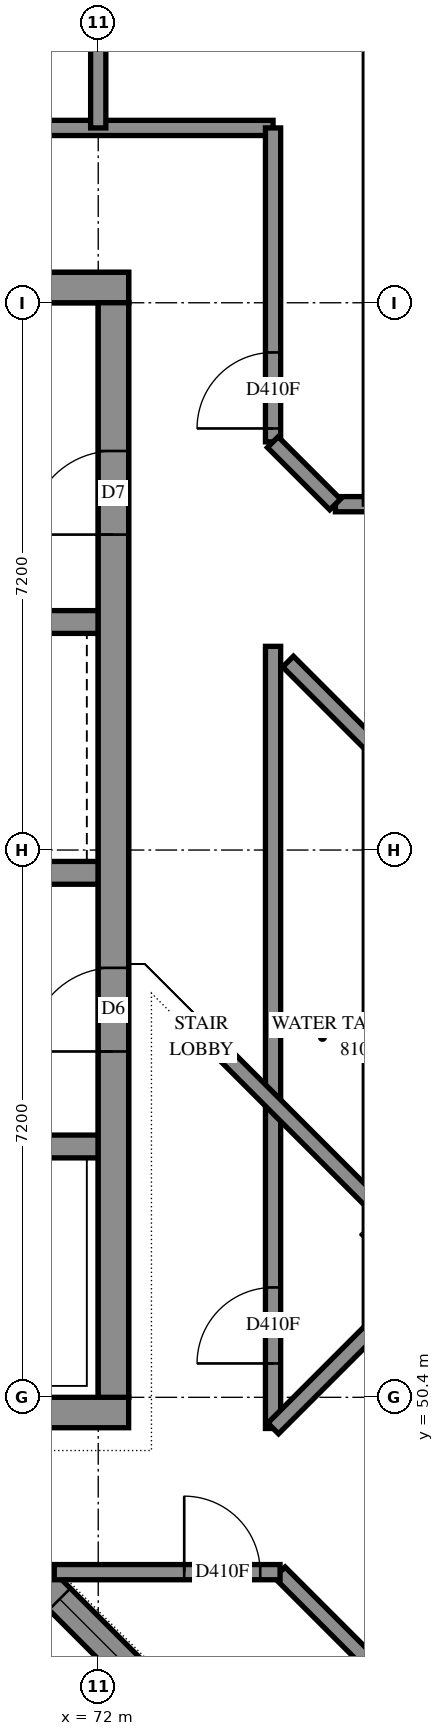
"""IFC4 building model, lengths in metres.
Left out: names, types, materials, properties, quantities, classifications, styles, units other than length and angle.
Written with IfcOpenShell. Run it as: python <this file> out.ifc"""

import sys

from ifc_helpers import new_model, si_unit, direction, frame, frame_2d, origin, place, context, subcontext, project, spatial, polyline, rectangle, outline, extrude, element, fill, save


model = new_model("IFC4")
c1 = context("Model", 3, precision=1e-05, world=origin(), true_north=direction((0.0, 1.0)))
c2 = subcontext(c1, "Body", "Model", "MODEL_VIEW")
j1 = project(units=[si_unit("LENGTHUNIT", "METRE"), si_unit("PLANEANGLEUNIT", "RADIAN")], contexts=[c1])
p1 = place(None, origin())
s1 = spatial("IfcSite", under=j1, at=p1, CompositionType="ELEMENT")
p2 = place(p1, origin())
s2 = spatial("IfcBuilding", under=s1, at=p2, CompositionType="ELEMENT")
p3 = place(p2, frame((0.0, 0.0, 298.2)))
s3 = spatial("IfcBuildingStorey", under=s2, at=p3, CompositionType="ELEMENT", Elevation=298.2)
p4 = place(p3, frame((69.746, 50.2, -0.3), z_axis=(0.0, 0.0, 1.0), x_axis=(1.0, 0.0, 0.0)))
e1 = element("IfcWall", 1, at=p4, inside=s3, PredefinedType="SHEAR", context=c2, shape_type="SweptSolid", body=[
    extrude(outline(polyline([(0.0, 0.0), (2.654, 0.0), (2.654, 3.1), (0.0, 3.1), (0.0, 0.0)])), frame((0.0, 0.2, 0.0), z_axis=(0.0, -1.0, 0.0), x_axis=(1.0, 0.0, 0.0)), (0.0, 0.0, 1.0), 0.4),
])
p5 = place(p3, frame((57.2, 65.0, -0.3), z_axis=(0.0, 0.0, 1.0), x_axis=(1.0, 0.0, 0.0)))
e2 = element("IfcWall", 2, at=p5, inside=s3, PredefinedType="SHEAR", context=c2, shape_type="SweptSolid", body=[
    extrude(outline(polyline([(0.0, 0.0), (15.2, 0.0), (15.2, 3.1), (0.0, 3.1), (0.0, 0.0)])), frame((0.0, 0.2, 0.0), z_axis=(0.0, -1.0, 0.0), x_axis=(1.0, 0.0, 0.0)), (0.0, 0.0, 1.0), 0.4),
])
p6 = place(p5, frame((10.4, 0.0, 0.3)))
e3 = element("IfcOpeningElement", 3, at=p6, cuts=e2, PredefinedType="OPENING", context=c2, shape_type="SweptSolid", body=[
    extrude(rectangle(XDim=0.8, YDim=2.1, at=frame_2d((0.4, 1.05))), frame((0.0, 0.21, 0.0), z_axis=(0.0, -1.0, 0.0), x_axis=(1.0, 0.0, 0.0)), (0.0, 0.0, 1.0), 0.42),
])
p7 = place(p3, frame((72.2, 50.4, -0.3), z_axis=(0.0, 0.0, 1.0), x_axis=(0.0, 1.0, 0.0)))
e4 = element("IfcWall", 4, at=p7, inside=s3, PredefinedType="SHEAR", context=c2, shape_type="SweptSolid", body=[
    extrude(outline(polyline([(0.0, 0.0), (14.4, 0.0), (14.4, 3.1), (0.0, 3.1), (0.0, 0.0)])), frame((0.0, 0.2, 0.0), z_axis=(0.0, -1.0, 0.0), x_axis=(1.0, 0.0, 0.0)), (0.0, 0.0, 1.0), 0.4),
])
p8 = place(p7, frame((4.55, 0.0, 0.3)))
e5 = element("IfcOpeningElement", 5, at=p8, cuts=e4, PredefinedType="OPENING", context=c2, shape_type="SweptSolid", body=[
    extrude(rectangle(XDim=1.1, YDim=2.1, at=frame_2d((0.55, 1.05))), frame((0.0, 0.21, 0.0), z_axis=(0.0, -1.0, 0.0), x_axis=(1.0, 0.0, 0.0)), (0.0, 0.0, 1.0), 0.42),
])
p9 = place(p7, frame((11.35, 0.0, 0.3)))
e6 = element("IfcOpeningElement", 6, at=p9, cuts=e4, PredefinedType="OPENING", context=c2, shape_type="SweptSolid", body=[
    extrude(rectangle(XDim=1.1, YDim=2.1, at=frame_2d((0.55, 1.05))), frame((0.0, 0.21, 0.0), z_axis=(0.0, -1.0, 0.0), x_axis=(1.0, 0.0, 0.0)), (0.0, 0.0, 1.0), 0.42),
])
p10 = place(p3, frame((66.246, 53.7, 0.0), z_axis=(0.0, 0.0, 1.0), x_axis=(1.0, 0.0, 0.0)))
e7 = element("IfcWall", 7, at=p10, inside=s3, PredefinedType="SOLIDWALL", context=c2, shape_type="SweptSolid", body=[
    extrude(outline(polyline([(0.0, 0.0), (5.754, 0.0), (5.754, 3.5), (0.0, 3.5), (0.0, 0.0)])), frame((0.0, 0.15, 0.0), z_axis=(0.0, -1.0, 0.0), x_axis=(1.0, 0.0, 0.0)), (0.0, 0.0, 1.0), 0.3),
])
p11 = place(p10, frame((3.404, 0.0, 0.0)))
e8 = element("IfcOpeningElement", 8, at=p11, cuts=e7, PredefinedType="OPENING", context=c2, shape_type="SweptSolid", body=[
    extrude(rectangle(XDim=1.1, YDim=2.1, at=frame_2d((0.55, 1.05))), frame((0.0, 0.16, 0.0), z_axis=(0.0, -1.0, 0.0), x_axis=(1.0, 0.0, 0.0)), (0.0, 0.0, 1.0), 0.32),
])
p12 = place(p3, frame((57.6, 57.3, 0.0), z_axis=(0.0, 0.0, 1.0), x_axis=(1.0, 0.0, 0.0)))
e9 = element("IfcWall", 9, at=p12, inside=s3, PredefinedType="SOLIDWALL", context=c2, shape_type="SweptSolid", body=[
    extrude(outline(polyline([(0.0, 0.0), (14.4, 0.0), (14.4, 3.5), (0.0, 3.5), (0.0, 0.0)])), frame((0.0, 0.15, 0.0), z_axis=(0.0, -1.0, 0.0), x_axis=(1.0, 0.0, 0.0)), (0.0, 0.0, 1.0), 0.3),
])
p13 = place(p12, frame((12.05, 0.0, 0.0)))
e10 = element("IfcOpeningElement", 10, at=p13, cuts=e9, PredefinedType="OPENING", context=c2, shape_type="SweptSolid", body=[
    extrude(rectangle(XDim=1.1, YDim=2.1, at=frame_2d((0.55, 1.05))), frame((0.0, 0.16, 0.0), z_axis=(0.0, -1.0, 0.0), x_axis=(1.0, 0.0, 0.0)), (0.0, 0.0, 1.0), 0.32),
])
p14 = place(p3, frame((64.8, 60.6, 0.0), z_axis=(0.0, 0.0, 1.0), x_axis=(1.0, 0.0, 0.0)))
e11 = element("IfcWall", 11, at=p14, inside=s3, PredefinedType="SOLIDWALL", context=c2, shape_type="SweptSolid", body=[
    extrude(outline(polyline([(0.0, 0.0), (7.2, 0.0), (7.2, 3.5), (0.0, 3.5), (0.0, 0.0)])), frame((0.0, 0.15, 0.0), z_axis=(0.0, -1.0, 0.0), x_axis=(1.0, 0.0, 0.0)), (0.0, 0.0, 1.0), 0.3),
])
p15 = place(p3, frame((70.585, 48.654, 0.0), z_axis=(0.0, 0.0, 1.0), x_axis=(0.707112816, -0.7071007463, 0.0)))
e12 = element("IfcWall", 12, at=p15, inside=s3, PredefinedType="SOLIDWALL", context=c2, shape_type="SweptSolid", body=[
    extrude(outline(polyline([(0.0, -0.2), (8.256, -0.2), (8.314, 0.2), (0.0, 0.2), (0.0, -0.2)])), origin(), (0.0, 0.0, 1.0), 3.5),
])
p16 = place(p15, frame((1.284, 0.0, 0.7)))
e13 = element("IfcOpeningElement", 13, at=p16, cuts=e12, PredefinedType="OPENING", context=c2, shape_type="SweptSolid", body=[
    extrude(rectangle(XDim=1.8, YDim=2.2, at=frame_2d((0.9, 1.1))), frame((0.0, 0.21, 0.0), z_axis=(0.0, -1.0, 0.0), x_axis=(1.0, 0.0, 0.0)), (0.0, 0.0, 1.0), 0.42),
])
p17 = place(p15, frame((4.884, 0.0, 0.7)))
e14 = element("IfcOpeningElement", 14, at=p17, cuts=e12, PredefinedType="OPENING", context=c2, shape_type="SweptSolid", body=[
    extrude(rectangle(XDim=1.8, YDim=2.2, at=frame_2d((0.9, 1.1))), frame((0.0, 0.21, 0.0), z_axis=(0.0, -1.0, 0.0), x_axis=(1.0, 0.0, 0.0)), (0.0, 0.0, 1.0), 0.42),
])
p18 = place(p3, frame((55.302, 67.1, 0.0), z_axis=(0.0, 0.0, 1.0), x_axis=(1.0, 0.0, 0.0)))
e15 = element("IfcWall", 15, at=p18, inside=s3, PredefinedType="PARTITIONING", context=c2, shape_type="SweptSolid", body=[
    extrude(rectangle(XDim=18.998, YDim=0.2, at=frame_2d((9.499, 0.0))), origin(), (0.0, 0.0, 1.0), 3.5),
])
p19 = place(p18, frame((0.758, 0.0, 0.0)))
e16 = element("IfcOpeningElement", 16, at=p19, cuts=e15, PredefinedType="OPENING", context=c2, shape_type="SweptSolid", body=[
    extrude(rectangle(XDim=1.0, YDim=2.1, at=frame_2d((0.5, 1.05))), frame((0.0, 0.11, 0.0), z_axis=(0.0, -1.0, 0.0), x_axis=(1.0, 0.0, 0.0)), (0.0, 0.0, 1.0), 0.22),
])
p20 = place(p18, frame((10.04, 0.0, 0.0)))
e17 = element("IfcOpeningElement", 17, at=p20, cuts=e15, PredefinedType="OPENING", context=c2, shape_type="SweptSolid", body=[
    extrude(rectangle(XDim=1.0, YDim=2.1, at=frame_2d((0.5, 1.05))), frame((0.0, 0.11, 0.0), z_axis=(0.0, -1.0, 0.0), x_axis=(1.0, 0.0, 0.0)), (0.0, 0.0, 1.0), 0.22),
])
p21 = place(p3, frame((74.3, 49.99, 0.0), z_axis=(0.0, 0.0, 1.0), x_axis=(0.0, 1.0, 0.0)))
e18 = element("IfcWall", 18, at=p21, inside=s3, PredefinedType="PARTITIONING", context=c2, shape_type="SweptSolid", body=[
    extrude(rectangle(XDim=10.29, YDim=0.2, at=frame_2d((5.145, 0.0))), origin(), (0.0, 0.0, 1.0), 3.5),
])
p22 = place(p21, frame((0.856, 0.0, 0.0)))
e19 = element("IfcOpeningElement", 19, at=p22, cuts=e18, PredefinedType="OPENING", context=c2, shape_type="SweptSolid", body=[
    extrude(rectangle(XDim=1.0, YDim=2.1, at=frame_2d((0.5, 1.05))), frame((0.0, 0.11, 0.0), z_axis=(0.0, -1.0, 0.0), x_axis=(1.0, 0.0, 0.0)), (0.0, 0.0, 1.0), 0.22),
])
p23 = place(p3, frame((74.388, 48.096, 0.0), z_axis=(0.0, 0.0, 1.0), x_axis=(0.7071067812, -0.7071067812, 0.0)))
e20 = element("IfcWall", 20, at=p23, inside=s3, PredefinedType="PARTITIONING", context=c2, shape_type="SweptSolid", body=[
    extrude(rectangle(XDim=8.9, YDim=0.2, at=frame_2d((4.45, 0.0))), origin(), (0.0, 0.0, 1.0), 3.5),
])
p24 = place(p23, frame((2.564, 0.0, 0.0)))
e21 = element("IfcOpeningElement", 21, at=p24, cuts=e20, PredefinedType="OPENING", context=c2, shape_type="SweptSolid", body=[
    extrude(rectangle(XDim=1.0, YDim=2.1, at=frame_2d((0.5, 1.05))), frame((0.0, 0.11, 0.0), z_axis=(0.0, -1.0, 0.0), x_axis=(1.0, 0.0, 0.0)), (0.0, 0.0, 1.0), 0.22),
])
p25 = place(p3, frame((74.301, 49.991, 0.0), z_axis=(0.0, 0.0, 1.0), x_axis=(0.7071067812, 0.7071067812, 0.0)))
e22 = element("IfcWall", 22, at=p25, inside=s3, PredefinedType="PARTITIONING", context=c2, shape_type="SweptSolid", body=[
    extrude(rectangle(XDim=7.275, YDim=0.2, at=frame_2d((3.637, 0.0))), origin(), (0.0, 0.0, 1.0), 3.5),
])
p26 = place(p25, frame((2.615, 0.0, 0.0)))
e23 = element("IfcOpeningElement", 23, at=p26, cuts=e22, PredefinedType="OPENING", context=c2, shape_type="SweptSolid", body=[
    extrude(rectangle(XDim=1.0, YDim=2.1, at=frame_2d((0.5, 1.05))), frame((0.0, 0.11, 0.0), z_axis=(0.0, -1.0, 0.0), x_axis=(1.0, 0.0, 0.0)), (0.0, 0.0, 1.0), 0.22),
])
p27 = place(p3, frame((72.0, 67.1, 0.0), z_axis=(0.0, 0.0, 1.0), x_axis=(0.0, 1.0, 0.0)))
e24 = element("IfcWall", 24, at=p27, inside=s3, PredefinedType="PARTITIONING", context=c2, shape_type="SweptSolid", body=[
    extrude(rectangle(XDim=5.25, YDim=0.2, at=frame_2d((2.625, 0.0))), origin(), (0.0, 0.0, 1.0), 3.5),
])
p28 = place(p3, frame((74.3, 62.97, 0.0), z_axis=(0.0, 0.0, 1.0), x_axis=(0.0, 1.0, 0.0)))
e25 = element("IfcWall", 25, at=p28, inside=s3, PredefinedType="PARTITIONING", context=c2, shape_type="SweptSolid", body=[
    extrude(rectangle(XDim=4.13, YDim=0.2, at=frame_2d((2.065, 0.0))), origin(), (0.0, 0.0, 1.0), 3.5),
])
p29 = place(p28, frame((0.176, 0.0, 0.0)))
e26 = element("IfcOpeningElement", 26, at=p29, cuts=e25, PredefinedType="OPENING", context=c2, shape_type="SweptSolid", body=[
    extrude(rectangle(XDim=1.0, YDim=2.1, at=frame_2d((0.5, 1.05))), frame((0.0, 0.11, 0.0), z_axis=(0.0, -1.0, 0.0), x_axis=(1.0, 0.0, 0.0)), (0.0, 0.0, 1.0), 0.22),
])
p30 = place(p3, frame((75.12, 62.15, 0.0), z_axis=(0.0, 0.0, 1.0), x_axis=(1.0, 0.0, 0.0)))
e27 = element("IfcWall", 27, at=p30, inside=s3, PredefinedType="PARTITIONING", context=c2, shape_type="SweptSolid", body=[
    extrude(rectangle(XDim=4.08, YDim=0.2, at=frame_2d((2.04, 0.0))), origin(), (0.0, 0.0, 1.0), 3.5),
])
p31 = place(p30, frame((1.048, 0.0, 0.0)))
e28 = element("IfcOpeningElement", 28, at=p31, cuts=e27, PredefinedType="OPENING", context=c2, shape_type="SweptSolid", body=[
    extrude(rectangle(XDim=1.0, YDim=2.1, at=frame_2d((0.5, 1.05))), frame((0.0, 0.11, 0.0), z_axis=(0.0, -1.0, 0.0), x_axis=(1.0, 0.0, 0.0)), (0.0, 0.0, 1.0), 0.22),
])
p32 = place(p3, frame((74.497, 60.079, 0.0), z_axis=(0.0, 0.0, 1.0), x_axis=(0.7071067812, -0.7071067812, 0.0)))
e29 = element("IfcWall", 29, at=p32, inside=s3, PredefinedType="PARTITIONING", context=c2, shape_type="SweptSolid", body=[
    extrude(rectangle(XDim=2.096, YDim=0.2, at=frame_2d((1.048, 0.0))), origin(), (0.0, 0.0, 1.0), 3.5),
])
p33 = place(p3, frame((74.297, 62.967, 0.0), z_axis=(0.0, 0.0, 1.0), x_axis=(0.7071067812, -0.7071067812, 0.0)))
e30 = element("IfcWall", 30, at=p33, inside=s3, PredefinedType="PARTITIONING", context=c2, shape_type="SweptSolid", body=[
    extrude(rectangle(XDim=1.16, YDim=0.2, at=frame_2d((0.58, 0.0))), origin(), (0.0, 0.0, 1.0), 3.5),
])
p34 = place(p3, frame((75.65, 52.923, 0.0), z_axis=(0.0, 0.0, 1.0), x_axis=(-0.7071067812, 0.7071067812, 0.0)))
e31 = element("IfcWall", 31, at=p34, inside=s3, PredefinedType="PARAPET", context=c2, shape_type="SweptSolid", body=[
    extrude(outline(polyline([(0.0, -0.1), (3.294, -0.1), (3.294, 0.1), (0.0, 0.1), (0.0, -0.1)])), origin(), (0.0, 0.0, 1.0), 0.25),
])
p35 = place(p3, frame((71.422, 48.1, 0.0), z_axis=(0.0, 0.0, 1.0), x_axis=(1.0, 0.0, 0.0)))
e32 = element("IfcWall", 32, at=p35, inside=s3, PredefinedType="PARTITIONING", context=c2, shape_type="SweptSolid", body=[
    extrude(outline(polyline([(0.0, -0.1), (2.97, -0.1), (2.97, 0.1), (0.0, 0.1), (0.0, -0.1)])), origin(), (0.0, 0.0, 1.0), 3.5),
])
p36 = place(p35, frame((1.71, 0.0, 0.0)))
e33 = element("IfcOpeningElement", 33, at=p36, cuts=e32, PredefinedType="OPENING", context=c2, shape_type="SweptSolid", body=[
    extrude(rectangle(XDim=1.0, YDim=2.1, at=frame_2d((0.5, 1.05))), frame((0.0, 0.11, 0.0), z_axis=(0.0, -1.0, 0.0), x_axis=(1.0, 0.0, 0.0)), (0.0, 0.0, 1.0), 0.22),
])
p37 = place(p16, origin())
e34 = element("IfcWindow", 34, at=p37, inside=s3, PartitioningType="SINGLE_PANEL", PredefinedType="WINDOW", context=c2, shape_type="SweptSolid", body=[
    extrude(rectangle(XDim=1.8, YDim=2.2, at=frame_2d((0.9, 1.1))), frame((0.0, 0.08, 0.0), z_axis=(0.0, -1.0, 0.0), x_axis=(1.0, 0.0, 0.0)), (0.0, 0.0, 1.0), 0.06),
])
fill(e13, e34)
p38 = place(p8, origin())
e35 = element("IfcDoor", 35, at=p38, inside=s3, OperationType="DOUBLE_DOOR_SINGLE_SWING", PredefinedType="DOOR", context=c2, shape_type="SweptSolid", body=[
    extrude(rectangle(XDim=1.1, YDim=2.1, at=frame_2d((0.55, 1.05))), frame((0.0, 0.025, 0.0), z_axis=(0.0, -1.0, 0.0), x_axis=(1.0, 0.0, 0.0)), (0.0, 0.0, 1.0), 0.05),
])
fill(e5, e35)
p39 = place(p9, origin())
e36 = element("IfcDoor", 36, at=p39, inside=s3, OperationType="SINGLE_SWING_RIGHT", PredefinedType="DOOR", context=c2, shape_type="SweptSolid", body=[
    extrude(rectangle(XDim=1.1, YDim=2.1, at=frame_2d((0.55, 1.05))), frame((0.0, 0.025, 0.0), z_axis=(0.0, -1.0, 0.0), x_axis=(1.0, 0.0, 0.0)), (0.0, 0.0, 1.0), 0.05),
])
fill(e6, e36)
p40 = place(p36, origin())
e37 = element("IfcDoor", 37, at=p40, inside=s3, OperationType="SINGLE_SWING_LEFT", PredefinedType="DOOR", context=c2, shape_type="SweptSolid", body=[
    extrude(rectangle(XDim=1.0, YDim=2.1, at=frame_2d((0.5, 1.05))), frame((0.0, 0.025, 0.0), z_axis=(0.0, -1.0, 0.0), x_axis=(1.0, 0.0, 0.0)), (0.0, 0.0, 1.0), 0.05),
])
fill(e33, e37)
p41 = place(p22, origin())
e38 = element("IfcDoor", 38, at=p41, inside=s3, OperationType="SINGLE_SWING_LEFT", PredefinedType="DOOR", context=c2, shape_type="SweptSolid", body=[
    extrude(rectangle(XDim=1.0, YDim=2.1, at=frame_2d((0.5, 1.05))), frame((0.0, 0.025, 0.0), z_axis=(0.0, -1.0, 0.0), x_axis=(1.0, 0.0, 0.0)), (0.0, 0.0, 1.0), 0.05),
])
fill(e19, e38)
p42 = place(p29, origin())
e39 = element("IfcDoor", 39, at=p42, inside=s3, OperationType="SINGLE_SWING_RIGHT", PredefinedType="DOOR", context=c2, shape_type="SweptSolid", body=[
    extrude(rectangle(XDim=1.0, YDim=2.1, at=frame_2d((0.5, 1.05))), frame((0.0, 0.025, 0.0), z_axis=(0.0, -1.0, 0.0), x_axis=(1.0, 0.0, 0.0)), (0.0, 0.0, 1.0), 0.05),
])
fill(e26, e39)
save(model, sys.argv[1])
